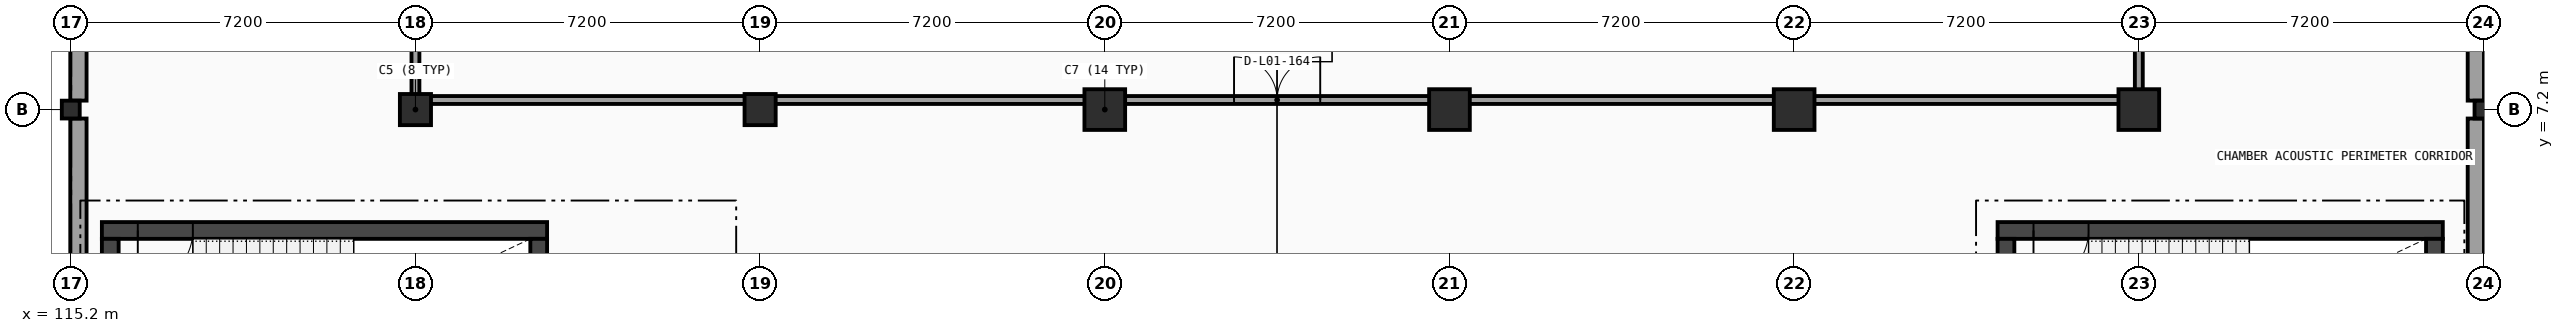
"""IFC4 building model, lengths in metres.
Left out: names, types, materials, properties, quantities, classifications, styles, units other than length and angle.
Written with IfcOpenShell. Run it as: python <this file> out.ifc"""

import sys

from ifc_helpers import new_model, si_unit, direction, frame, frame_2d, origin, origin_2d, place, context, subcontext, project, spatial, rectangle, circle, i_section, extrude, element, fill, save


model = new_model("IFC4")
c1 = context("Model", 3, precision=1e-05, world=origin(), true_north=direction((0.0, 1.0)))
c2 = subcontext(c1, "Body", "Model", "MODEL_VIEW")
j1 = project(units=[si_unit("LENGTHUNIT", "METRE"), si_unit("PLANEANGLEUNIT", "RADIAN")], contexts=[c1])
p1 = place(None, origin())
s1 = spatial("IfcSite", under=j1, at=p1, CompositionType="ELEMENT")
p2 = place(p1, origin())
s2 = spatial("IfcBuilding", under=s1, at=p2, CompositionType="ELEMENT")
p3 = place(p2, frame((0.0, 0.0, 5.4)))
s3 = spatial("IfcBuildingStorey", under=s2, at=p3, CompositionType="ELEMENT", Elevation=5.4)
p4 = place(p3, frame((115.2, 7.2, 0.0), z_axis=(0.0, 0.0, 1.0), x_axis=(1.0, 0.0, 0.0)))
e1 = element("IfcColumn", 1, at=p4, inside=s3, PredefinedType="COLUMN", context=c2, shape_type="SweptSolid", body=[
    extrude(i_section(OverallWidth=0.374, OverallDepth=0.372, WebThickness=0.016, FlangeThickness=0.026, FilletRadius=0.018, at=origin_2d()), origin(), (0.0, 0.0, 1.0), 4.8),
])
for number, where, z_axis, x_axis in (
    (2, (122.4, 7.2, 0.0), (0.0, 0.0, 1.0), (1.0, 0.0, 0.0)),
    (3, (129.6, 7.2, 0.0), (0.0, 0.0, 1.0), (1.0, 0.0, 0.0)),
):
    element("IfcColumn", number, at=place(p3, frame(where, z_axis=z_axis, x_axis=x_axis)), inside=s3, PredefinedType="COLUMN", context=c2, shape_type="SweptSolid", body=[
        extrude(rectangle(XDim=0.65, YDim=0.65, at=origin_2d()), origin(), (0.0, 0.0, 1.0), 4.8),
    ])
for number, where, z_axis, x_axis in (
    (4, (136.8, 7.2, 0.0), (0.0, 0.0, 1.0), (1.0, 0.0, 0.0)),
    (5, (144.0, 7.2, 0.0), (0.0, 0.0, 1.0), (1.0, 0.0, 0.0)),
    (6, (151.2, 7.2, 0.0), (0.0, 0.0, 1.0), (1.0, 0.0, 0.0)),
    (7, (158.4, 7.2, 0.0), (0.0, 0.0, 1.0), (1.0, 0.0, 0.0)),
):
    element("IfcColumn", number, at=place(p3, frame(where, z_axis=z_axis, x_axis=x_axis)), inside=s3, PredefinedType="COLUMN", context=c2, shape_type="SweptSolid", body=[
        extrude(circle(Radius=0.425, at=origin_2d()), origin(), (0.0, 0.0, 1.0), 4.8),
    ])
p5 = place(p3, frame((165.6, 7.2, 0.0), z_axis=(0.0, 0.0, 1.0), x_axis=(1.0, 0.0, 0.0)))
e8 = element("IfcColumn", 8, at=p5, inside=s3, PredefinedType="COLUMN", context=c2, shape_type="SweptSolid", body=[
    extrude(i_section(OverallWidth=0.374, OverallDepth=0.372, WebThickness=0.016, FlangeThickness=0.026, FilletRadius=0.018, at=origin_2d()), origin(), (0.0, 0.0, 1.0), 4.8),
])
for number, where, z_axis, x_axis in (
    (9, (165.44, 14.213, 0.0), (0.0, 0.0, 1.0), (0.0, -1.0, 0.0)),
    (10, (165.44, 7.013, 0.0), (0.0, 0.0, 1.0), (0.0, -1.0, 0.0)),
    (11, (115.36, 0.187, 0.0), (0.0, 0.0, 1.0), (0.0, 1.0, 0.0)),
    (12, (115.36, 7.387, 0.0), (0.0, 0.0, 1.0), (0.0, 1.0, 0.0)),
):
    element("IfcWall", number, at=place(p3, frame(where, z_axis=z_axis, x_axis=x_axis)), inside=s3, PredefinedType="SOLIDWALL", context=c2, shape_type="SweptSolid", body=[
        extrude(rectangle(XDim=6.826, YDim=0.34, at=frame_2d((3.413, 0.0))), origin(), (0.0, 0.0, 1.0), 3.976),
    ])
p6 = place(p3, frame((125.15, 4.675, 0.0), z_axis=(0.0, 0.0, 1.0), x_axis=(-1.0, 0.0, 0.0)))
e13 = element("IfcWall", 13, at=p6, inside=s3, PredefinedType="SHEAR", context=c2, shape_type="SweptSolid", body=[
    extrude(rectangle(XDim=9.3, YDim=0.35, at=frame_2d((4.65, 0.0))), origin(), (0.0, 0.0, 1.0), 4.52),
])
p7 = place(p6, frame((7.4, 0.0, 0.0)))
e14 = element("IfcOpeningElement", 14, at=p7, cuts=e13, PredefinedType="OPENING", context=c2, shape_type="SweptSolid", body=[
    extrude(rectangle(XDim=1.15, YDim=2.1, at=frame_2d((0.575, 1.05))), frame((0.0, 0.185, 0.0), z_axis=(0.0, -1.0, 0.0), x_axis=(1.0, 0.0, 0.0)), (0.0, 0.0, 1.0), 0.37),
])
for number, where, z_axis, x_axis in (
    (15, (116.025, 4.5, 0.0), (0.0, 0.0, 1.0), (0.0, -1.0, 0.0)),
    (16, (124.975, 1.2, 0.0), (0.0, 0.0, 1.0), (0.0, 1.0, 0.0)),
):
    element("IfcWall", number, at=place(p3, frame(where, z_axis=z_axis, x_axis=x_axis)), inside=s3, PredefinedType="SHEAR", context=c2, shape_type="SweptSolid", body=[
        extrude(rectangle(XDim=3.3, YDim=0.35, at=frame_2d((1.65, 0.0))), origin(), (0.0, 0.0, 1.0), 4.52),
    ])
p8 = place(p3, frame((164.75, 4.675, 0.0), z_axis=(0.0, 0.0, 1.0), x_axis=(-1.0, 0.0, 0.0)))
e17 = element("IfcWall", 17, at=p8, inside=s3, PredefinedType="SHEAR", context=c2, shape_type="SweptSolid", body=[
    extrude(rectangle(XDim=9.3, YDim=0.35, at=frame_2d((4.65, 0.0))), origin(), (0.0, 0.0, 1.0), 4.52),
])
p9 = place(p8, frame((7.4, 0.0, 0.0)))
e18 = element("IfcOpeningElement", 18, at=p9, cuts=e17, PredefinedType="OPENING", context=c2, shape_type="SweptSolid", body=[
    extrude(rectangle(XDim=1.15, YDim=2.1, at=frame_2d((0.575, 1.05))), frame((0.0, 0.185, 0.0), z_axis=(0.0, -1.0, 0.0), x_axis=(1.0, 0.0, 0.0)), (0.0, 0.0, 1.0), 0.37),
])
for number, where, z_axis, x_axis in (
    (19, (155.625, 4.5, 0.0), (0.0, 0.0, 1.0), (0.0, -1.0, 0.0)),
    (20, (164.575, 1.2, 0.0), (0.0, 0.0, 1.0), (0.0, 1.0, 0.0)),
):
    element("IfcWall", number, at=place(p3, frame(where, z_axis=z_axis, x_axis=x_axis)), inside=s3, PredefinedType="SHEAR", context=c2, shape_type="SweptSolid", body=[
        extrude(rectangle(XDim=3.3, YDim=0.35, at=frame_2d((1.65, 0.0))), origin(), (0.0, 0.0, 1.0), 4.52),
    ])
p10 = place(p3, frame((122.44, 7.4, 0.0), z_axis=(0.0, 0.0, 1.0), x_axis=(1.0, 0.0, 0.0)))
e21 = element("IfcWall", 21, at=p10, inside=s3, PredefinedType="PARTITIONING", context=c2, shape_type="SweptSolid", body=[
    extrude(rectangle(XDim=35.92, YDim=0.165, at=frame_2d((17.96, 0.0))), origin(), (0.0, 0.0, 1.0), 4.52),
])
p11 = place(p10, frame((17.06, 0.0, 0.0)))
e22 = element("IfcOpeningElement", 22, at=p11, cuts=e21, PredefinedType="OPENING", context=c2, shape_type="SweptSolid", body=[
    extrude(rectangle(XDim=1.8, YDim=2.15, at=frame_2d((0.9, 1.075))), frame((0.0, 0.093, 0.0), z_axis=(0.0, -1.0, 0.0), x_axis=(1.0, 0.0, 0.0)), (0.0, 0.0, 1.0), 0.185),
])
p12 = place(p3, frame((122.4, 7.44, 0.0), z_axis=(0.0, 0.0, 1.0), x_axis=(0.0, 1.0, 0.0)))
e23 = element("IfcWall", 23, at=p12, inside=s3, PredefinedType="PARTITIONING", context=c2, shape_type="SweptSolid", body=[
    extrude(rectangle(XDim=21.32, YDim=0.165, at=frame_2d((10.66, 0.0))), origin(), (0.0, 0.0, 1.0), 3.889),
])
p13 = place(p3, frame((158.4, 7.44, 0.0), z_axis=(0.0, 0.0, 1.0), x_axis=(0.0, 1.0, 0.0)))
e24 = element("IfcWall", 24, at=p13, inside=s3, PredefinedType="PARTITIONING", context=c2, shape_type="SweptSolid", body=[
    extrude(rectangle(XDim=21.32, YDim=0.165, at=frame_2d((10.66, 0.0))), origin(), (0.0, 0.0, 1.0), 3.889),
])
p14 = place(p13, frame((16.765, 0.0, 0.0)))
e25 = element("IfcOpeningElement", 25, at=p14, cuts=e24, PredefinedType="OPENING", context=c2, shape_type="SweptSolid", body=[
    extrude(rectangle(XDim=1.8, YDim=2.15, at=frame_2d((0.9, 1.075))), frame((0.0, 0.093, 0.0), z_axis=(0.0, -1.0, 0.0), x_axis=(1.0, 0.0, 0.0)), (0.0, 0.0, 1.0), 0.185),
])
p15 = place(p7, frame((1.15, 0.0, 0.0), z_axis=(0.0, 0.0, 1.0), x_axis=(-1.0, 0.0, 0.0)))
e26 = element("IfcDoor", 26, at=p15, inside=s3, OperationType="SINGLE_SWING_LEFT", PredefinedType="DOOR", context=c2, shape_type="SweptSolid", body=[
    extrude(rectangle(XDim=1.15, YDim=2.1, at=frame_2d((0.575, 1.05))), frame((0.0, 0.025, 0.0), z_axis=(0.0, -1.0, 0.0), x_axis=(1.0, 0.0, 0.0)), (0.0, 0.0, 1.0), 0.05),
])
fill(e14, e26)
p16 = place(p9, frame((1.15, 0.0, 0.0), z_axis=(0.0, 0.0, 1.0), x_axis=(-1.0, 0.0, 0.0)))
e27 = element("IfcDoor", 27, at=p16, inside=s3, OperationType="SINGLE_SWING_LEFT", PredefinedType="DOOR", context=c2, shape_type="SweptSolid", body=[
    extrude(rectangle(XDim=1.15, YDim=2.1, at=frame_2d((0.575, 1.05))), frame((0.0, 0.025, 0.0), z_axis=(0.0, -1.0, 0.0), x_axis=(1.0, 0.0, 0.0)), (0.0, 0.0, 1.0), 0.05),
])
fill(e18, e27)
p17 = place(p11, origin())
e28 = element("IfcDoor", 28, at=p17, inside=s3, OperationType="DOUBLE_DOOR_SINGLE_SWING", PredefinedType="DOOR", context=c2, shape_type="SweptSolid", body=[
    extrude(rectangle(XDim=1.8, YDim=2.15, at=frame_2d((0.9, 1.075))), frame((0.0, 0.025, 0.0), z_axis=(0.0, -1.0, 0.0), x_axis=(1.0, 0.0, 0.0)), (0.0, 0.0, 1.0), 0.05),
])
fill(e22, e28)
save(model, sys.argv[1])
